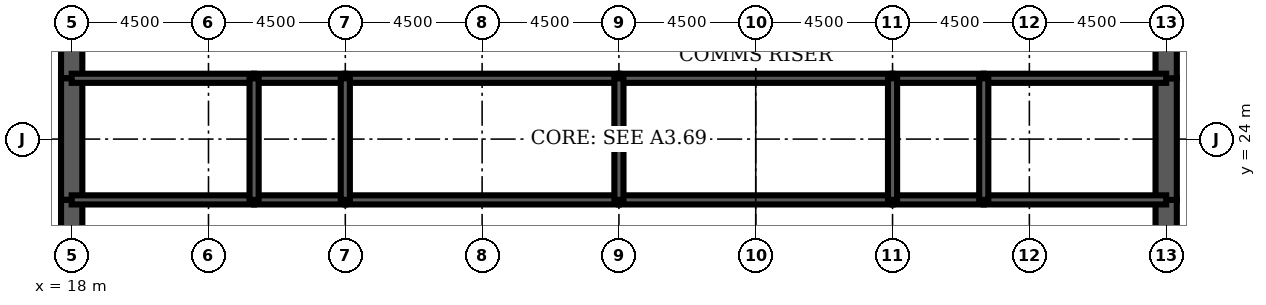
"""IFC4 building model, lengths in metres.
Left out: names, types, materials, properties, quantities, classifications, styles, units other than length and angle.
Written with IfcOpenShell. Run it as: python <this file> out.ifc"""

import sys

from ifc_helpers import new_model, si_unit, direction, frame, frame_2d, origin, place, context, subcontext, project, spatial, rectangle, extrude, element, fill, save


model = new_model("IFC4")
c1 = context("Model", 3, precision=1e-05, world=origin(), true_north=direction((0.0, 1.0)))
c2 = subcontext(c1, "Body", "Model", "MODEL_VIEW")
j1 = project(units=[si_unit("LENGTHUNIT", "METRE"), si_unit("PLANEANGLEUNIT", "RADIAN")], contexts=[c1])
p1 = place(None, origin())
s1 = spatial("IfcSite", under=j1, at=p1, CompositionType="ELEMENT")
p2 = place(p1, origin())
s2 = spatial("IfcBuilding", under=s1, at=p2, CompositionType="ELEMENT")
p3 = place(p2, frame((0.0, 0.0, 296.3)))
s3 = spatial("IfcBuildingStorey", under=s2, at=p3, CompositionType="ELEMENT", Elevation=296.3)
p4 = place(p3, frame((18.0, 28.8, 0.0), z_axis=(0.0, 0.0, 1.0), x_axis=(0.0, -1.0, 0.0)))
e1 = element("IfcWall", 1, at=p4, inside=s3, PredefinedType="SHEAR", context=c2, shape_type="SweptSolid", body=[
    extrude(rectangle(XDim=2.8, YDim=0.7, at=frame_2d((1.4, 0.0))), origin(), (0.0, 0.0, 1.0), 4.2),
])
p5 = place(p4, frame((0.4, 0.0, 0.0)))
e2 = element("IfcOpeningElement", 2, at=p5, cuts=e1, PredefinedType="OPENING", context=c2, shape_type="SweptSolid", body=[
    extrude(rectangle(XDim=1.8, YDim=2.1, at=frame_2d((0.9, 1.05))), frame((0.0, 0.36, 0.0), z_axis=(0.0, -1.0, 0.0), x_axis=(1.0, 0.0, 0.0)), (0.0, 0.0, 1.0), 0.72),
])
p6 = place(p3, frame((18.0, 26.0, 0.0), z_axis=(0.0, 0.0, 1.0), x_axis=(0.0, -1.0, 0.0)))
e3 = element("IfcWall", 3, at=p6, inside=s3, PredefinedType="SHEAR", context=c2, shape_type="SweptSolid", body=[
    extrude(rectangle(XDim=4.0, YDim=0.7, at=frame_2d((2.0, 0.0))), origin(), (0.0, 0.0, 1.0), 4.2),
])
p7 = place(p3, frame((18.0, 22.0, 0.0), z_axis=(0.0, 0.0, 1.0), x_axis=(0.0, -1.0, 0.0)))
e4 = element("IfcWall", 4, at=p7, inside=s3, PredefinedType="SHEAR", context=c2, shape_type="SweptSolid", body=[
    extrude(rectangle(XDim=2.8, YDim=0.7, at=frame_2d((1.4, 0.0))), origin(), (0.0, 0.0, 1.0), 4.2),
])
p8 = place(p7, frame((0.6, 0.0, 0.0)))
e5 = element("IfcOpeningElement", 5, at=p8, cuts=e4, PredefinedType="OPENING", context=c2, shape_type="SweptSolid", body=[
    extrude(rectangle(XDim=1.8, YDim=2.1, at=frame_2d((0.9, 1.05))), frame((0.0, 0.36, 0.0), z_axis=(0.0, -1.0, 0.0), x_axis=(1.0, 0.0, 0.0)), (0.0, 0.0, 1.0), 0.72),
])
p9 = place(p3, frame((54.0, 19.2, 0.0), z_axis=(0.0, 0.0, 1.0), x_axis=(0.0, 1.0, 0.0)))
e6 = element("IfcWall", 6, at=p9, inside=s3, PredefinedType="SHEAR", context=c2, shape_type="SweptSolid", body=[
    extrude(rectangle(XDim=2.8, YDim=0.7, at=frame_2d((1.4, 0.0))), origin(), (0.0, 0.0, 1.0), 4.2),
])
p10 = place(p9, frame((0.4, 0.0, 0.0)))
e7 = element("IfcOpeningElement", 7, at=p10, cuts=e6, PredefinedType="OPENING", context=c2, shape_type="SweptSolid", body=[
    extrude(rectangle(XDim=1.8, YDim=2.1, at=frame_2d((0.9, 1.05))), frame((0.0, 0.36, 0.0), z_axis=(0.0, -1.0, 0.0), x_axis=(1.0, 0.0, 0.0)), (0.0, 0.0, 1.0), 0.72),
])
p11 = place(p3, frame((54.0, 22.0, 0.0), z_axis=(0.0, 0.0, 1.0), x_axis=(0.0, 1.0, 0.0)))
e8 = element("IfcWall", 8, at=p11, inside=s3, PredefinedType="SHEAR", context=c2, shape_type="SweptSolid", body=[
    extrude(rectangle(XDim=4.0, YDim=0.7, at=frame_2d((2.0, 0.0))), origin(), (0.0, 0.0, 1.0), 4.2),
])
p12 = place(p3, frame((54.0, 26.0, 0.0), z_axis=(0.0, 0.0, 1.0), x_axis=(0.0, 1.0, 0.0)))
e9 = element("IfcWall", 9, at=p12, inside=s3, PredefinedType="SHEAR", context=c2, shape_type="SweptSolid", body=[
    extrude(rectangle(XDim=2.8, YDim=0.7, at=frame_2d((1.4, 0.0))), origin(), (0.0, 0.0, 1.0), 4.2),
])
p13 = place(p12, frame((0.6, 0.0, 0.0)))
e10 = element("IfcOpeningElement", 10, at=p13, cuts=e9, PredefinedType="OPENING", context=c2, shape_type="SweptSolid", body=[
    extrude(rectangle(XDim=1.8, YDim=2.1, at=frame_2d((0.9, 1.05))), frame((0.0, 0.36, 0.0), z_axis=(0.0, -1.0, 0.0), x_axis=(1.0, 0.0, 0.0)), (0.0, 0.0, 1.0), 0.72),
])
p14 = place(p3, frame((18.0, 22.0, 0.0), z_axis=(0.0, 0.0, 1.0), x_axis=(1.0, 0.0, 0.0)))
e11 = element("IfcWall", 11, at=p14, inside=s3, PredefinedType="SOLIDWALL", context=c2, shape_type="SweptSolid", body=[
    extrude(rectangle(XDim=6.0, YDim=0.3, at=frame_2d((3.0, 0.0))), origin(), (0.0, 0.0, 1.0), 4.2),
])
p15 = place(p14, frame((4.4, 0.0, 0.0)))
e12 = element("IfcOpeningElement", 12, at=p15, cuts=e11, PredefinedType="OPENING", context=c2, shape_type="SweptSolid", body=[
    extrude(rectangle(XDim=1.0, YDim=2.1, at=frame_2d((0.5, 1.05))), frame((0.0, 0.16, 0.0), z_axis=(0.0, -1.0, 0.0), x_axis=(1.0, 0.0, 0.0)), (0.0, 0.0, 1.0), 0.32),
])
p16 = place(p14, frame((0.6, 0.0, 0.0)))
e13 = element("IfcOpeningElement", 13, at=p16, cuts=e11, PredefinedType="OPENING", context=c2, shape_type="SweptSolid", body=[
    extrude(rectangle(XDim=1.0, YDim=2.1, at=frame_2d((0.5, 1.05))), frame((0.0, 0.16, 0.0), z_axis=(0.0, -1.0, 0.0), x_axis=(1.0, 0.0, 0.0)), (0.0, 0.0, 1.0), 0.32),
])
p17 = place(p3, frame((24.0, 22.0, 0.0), z_axis=(0.0, 0.0, 1.0), x_axis=(1.0, 0.0, 0.0)))
e14 = element("IfcWall", 14, at=p17, inside=s3, PredefinedType="SOLIDWALL", context=c2, shape_type="SweptSolid", body=[
    extrude(rectangle(XDim=3.0, YDim=0.3, at=frame_2d((1.5, 0.0))), origin(), (0.0, 0.0, 1.0), 4.2),
])
p18 = place(p17, frame((1.0, 0.0, 0.0)))
e15 = element("IfcOpeningElement", 15, at=p18, cuts=e14, PredefinedType="OPENING", context=c2, shape_type="SweptSolid", body=[
    extrude(rectangle(XDim=1.0, YDim=2.1, at=frame_2d((0.5, 1.05))), frame((0.0, 0.16, 0.0), z_axis=(0.0, -1.0, 0.0), x_axis=(1.0, 0.0, 0.0)), (0.0, 0.0, 1.0), 0.32),
])
p19 = place(p3, frame((27.0, 22.0, 0.0), z_axis=(0.0, 0.0, 1.0), x_axis=(1.0, 0.0, 0.0)))
e16 = element("IfcWall", 16, at=p19, inside=s3, PredefinedType="SOLIDWALL", context=c2, shape_type="SweptSolid", body=[
    extrude(rectangle(XDim=9.0, YDim=0.3, at=frame_2d((4.5, 0.0))), origin(), (0.0, 0.0, 1.0), 4.2),
])
p20 = place(p19, frame((4.0, 0.0, 0.0)))
e17 = element("IfcOpeningElement", 17, at=p20, cuts=e16, PredefinedType="OPENING", context=c2, shape_type="SweptSolid", body=[
    extrude(rectangle(XDim=1.0, YDim=2.1, at=frame_2d((0.5, 1.05))), frame((0.0, 0.16, 0.0), z_axis=(0.0, -1.0, 0.0), x_axis=(1.0, 0.0, 0.0)), (0.0, 0.0, 1.0), 0.32),
])
p21 = place(p3, frame((36.0, 22.0, 0.0), z_axis=(0.0, 0.0, 1.0), x_axis=(1.0, 0.0, 0.0)))
e18 = element("IfcWall", 18, at=p21, inside=s3, PredefinedType="SOLIDWALL", context=c2, shape_type="SweptSolid", body=[
    extrude(rectangle(XDim=9.0, YDim=0.3, at=frame_2d((4.5, 0.0))), origin(), (0.0, 0.0, 1.0), 4.2),
])
p22 = place(p21, frame((4.0, 0.0, 0.0)))
e19 = element("IfcOpeningElement", 19, at=p22, cuts=e18, PredefinedType="OPENING", context=c2, shape_type="SweptSolid", body=[
    extrude(rectangle(XDim=1.0, YDim=2.1, at=frame_2d((0.5, 1.05))), frame((0.0, 0.16, 0.0), z_axis=(0.0, -1.0, 0.0), x_axis=(1.0, 0.0, 0.0)), (0.0, 0.0, 1.0), 0.32),
])
p23 = place(p3, frame((45.0, 22.0, 0.0), z_axis=(0.0, 0.0, 1.0), x_axis=(1.0, 0.0, 0.0)))
e20 = element("IfcWall", 20, at=p23, inside=s3, PredefinedType="SOLIDWALL", context=c2, shape_type="SweptSolid", body=[
    extrude(rectangle(XDim=3.0, YDim=0.3, at=frame_2d((1.5, 0.0))), origin(), (0.0, 0.0, 1.0), 4.2),
])
p24 = place(p23, frame((1.0, 0.0, 0.0)))
e21 = element("IfcOpeningElement", 21, at=p24, cuts=e20, PredefinedType="OPENING", context=c2, shape_type="SweptSolid", body=[
    extrude(rectangle(XDim=1.0, YDim=2.1, at=frame_2d((0.5, 1.05))), frame((0.0, 0.16, 0.0), z_axis=(0.0, -1.0, 0.0), x_axis=(1.0, 0.0, 0.0)), (0.0, 0.0, 1.0), 0.32),
])
p25 = place(p3, frame((48.0, 22.0, 0.0), z_axis=(0.0, 0.0, 1.0), x_axis=(1.0, 0.0, 0.0)))
e22 = element("IfcWall", 22, at=p25, inside=s3, PredefinedType="SOLIDWALL", context=c2, shape_type="SweptSolid", body=[
    extrude(rectangle(XDim=6.0, YDim=0.3, at=frame_2d((3.0, 0.0))), origin(), (0.0, 0.0, 1.0), 4.2),
])
p26 = place(p25, frame((2.0, 0.0, 0.0)))
e23 = element("IfcOpeningElement", 23, at=p26, cuts=e22, PredefinedType="OPENING", context=c2, shape_type="SweptSolid", body=[
    extrude(rectangle(XDim=1.0, YDim=2.1, at=frame_2d((0.5, 1.05))), frame((0.0, 0.16, 0.0), z_axis=(0.0, -1.0, 0.0), x_axis=(1.0, 0.0, 0.0)), (0.0, 0.0, 1.0), 0.32),
])
p27 = place(p25, frame((4.1, 0.0, 0.0)))
e24 = element("IfcOpeningElement", 24, at=p27, cuts=e22, PredefinedType="OPENING", context=c2, shape_type="SweptSolid", body=[
    extrude(rectangle(XDim=1.0, YDim=2.1, at=frame_2d((0.5, 1.05))), frame((0.0, 0.16, 0.0), z_axis=(0.0, -1.0, 0.0), x_axis=(1.0, 0.0, 0.0)), (0.0, 0.0, 1.0), 0.32),
])
p28 = place(p3, frame((18.0, 26.0, 0.0), z_axis=(0.0, 0.0, 1.0), x_axis=(1.0, 0.0, 0.0)))
e25 = element("IfcWall", 25, at=p28, inside=s3, PredefinedType="SOLIDWALL", context=c2, shape_type="SweptSolid", body=[
    extrude(rectangle(XDim=6.0, YDim=0.3, at=frame_2d((3.0, 0.0))), origin(), (0.0, 0.0, 1.0), 4.2),
])
p29 = place(p3, frame((24.0, 26.0, 0.0), z_axis=(0.0, 0.0, 1.0), x_axis=(1.0, 0.0, 0.0)))
e26 = element("IfcWall", 26, at=p29, inside=s3, PredefinedType="SOLIDWALL", context=c2, shape_type="SweptSolid", body=[
    extrude(rectangle(XDim=3.0, YDim=0.3, at=frame_2d((1.5, 0.0))), origin(), (0.0, 0.0, 1.0), 4.2),
])
for number, where, z_axis, x_axis in (
    (27, (27.0, 26.0, 0.0), (0.0, 0.0, 1.0), (1.0, 0.0, 0.0)),
    (28, (36.0, 26.0, 0.0), (0.0, 0.0, 1.0), (1.0, 0.0, 0.0)),
):
    element("IfcWall", number, at=place(p3, frame(where, z_axis=z_axis, x_axis=x_axis)), inside=s3, PredefinedType="SOLIDWALL", context=c2, shape_type="SweptSolid", body=[
        extrude(rectangle(XDim=9.0, YDim=0.3, at=frame_2d((4.5, 0.0))), origin(), (0.0, 0.0, 1.0), 4.2),
    ])
p30 = place(p3, frame((45.0, 26.0, 0.0), z_axis=(0.0, 0.0, 1.0), x_axis=(1.0, 0.0, 0.0)))
e29 = element("IfcWall", 29, at=p30, inside=s3, PredefinedType="SOLIDWALL", context=c2, shape_type="SweptSolid", body=[
    extrude(rectangle(XDim=3.0, YDim=0.3, at=frame_2d((1.5, 0.0))), origin(), (0.0, 0.0, 1.0), 4.2),
])
p31 = place(p3, frame((48.0, 26.0, 0.0), z_axis=(0.0, 0.0, 1.0), x_axis=(1.0, 0.0, 0.0)))
e30 = element("IfcWall", 30, at=p31, inside=s3, PredefinedType="SOLIDWALL", context=c2, shape_type="SweptSolid", body=[
    extrude(rectangle(XDim=6.0, YDim=0.3, at=frame_2d((3.0, 0.0))), origin(), (0.0, 0.0, 1.0), 4.2),
])
for number, where, z_axis, x_axis in (
    (31, (24.0, 22.0, 0.0), (0.0, 0.0, 1.0), (0.0, 1.0, 0.0)),
    (32, (27.0, 22.0, 0.0), (0.0, 0.0, 1.0), (0.0, 1.0, 0.0)),
    (33, (36.0, 22.0, 0.0), (0.0, 0.0, 1.0), (0.0, 1.0, 0.0)),
    (34, (45.0, 22.0, 0.0), (0.0, 0.0, 1.0), (0.0, 1.0, 0.0)),
    (35, (48.0, 22.0, 0.0), (0.0, 0.0, 1.0), (0.0, 1.0, 0.0)),
):
    element("IfcWall", number, at=place(p3, frame(where, z_axis=z_axis, x_axis=x_axis)), inside=s3, PredefinedType="SOLIDWALL", context=c2, shape_type="SweptSolid", body=[
        extrude(rectangle(XDim=4.0, YDim=0.3, at=frame_2d((2.0, 0.0))), origin(), (0.0, 0.0, 1.0), 4.2),
    ])
p32 = place(p3, frame((38.5, 22.15, 0.0), z_axis=(0.0, 0.0, 1.0), x_axis=(0.0, 1.0, 0.0)))
e36 = element("IfcWall", 36, at=p32, inside=s3, PredefinedType="PARTITIONING", context=c2, shape_type="SweptSolid", body=[
    extrude(rectangle(XDim=3.7, YDim=0.15, at=frame_2d((1.85, 0.0))), origin(), (0.0, 0.0, 1.0), 3.0),
])
p33 = place(p32, frame((2.2, 0.0, 0.0)))
e37 = element("IfcOpeningElement", 37, at=p33, cuts=e36, PredefinedType="OPENING", context=c2, shape_type="SweptSolid", body=[
    extrude(rectangle(XDim=1.0, YDim=2.1, at=frame_2d((0.5, 1.05))), frame((0.0, 0.085, 0.0), z_axis=(0.0, -1.0, 0.0), x_axis=(1.0, 0.0, 0.0)), (0.0, 0.0, 1.0), 0.17),
])
for number, where, z_axis, x_axis in (
    (38, (19.925, 22.15, 0.0), (0.0, 0.0, 1.0), (0.0, 1.0, 0.0)),
    (39, (51.475, 22.15, 0.0), (0.0, 0.0, 1.0), (0.0, 1.0, 0.0)),
):
    element("IfcWall", number, at=place(p3, frame(where, z_axis=z_axis, x_axis=x_axis)), inside=s3, PredefinedType="PARTITIONING", context=c2, shape_type="SweptSolid", body=[
        extrude(rectangle(XDim=3.7, YDim=0.15, at=frame_2d((1.85, 0.0))), origin(), (0.0, 0.0, 1.0), 3.0),
    ])
p34 = place(p3, frame((23.7, 26.15, 0.0), z_axis=(0.0, 0.0, 1.0), x_axis=(0.0, 1.0, 0.0)))
e40 = element("IfcWall", 40, at=p34, inside=s3, PredefinedType="PARTITIONING", context=c2, shape_type="SweptSolid", body=[
    extrude(rectangle(XDim=2.5, YDim=0.15, at=frame_2d((1.25, 0.0))), origin(), (0.0, 0.0, 1.0), 3.0),
])
p35 = place(p34, frame((0.35, 0.0, 0.0)))
e41 = element("IfcOpeningElement", 41, at=p35, cuts=e40, PredefinedType="OPENING", context=c2, shape_type="SweptSolid", body=[
    extrude(rectangle(XDim=1.0, YDim=2.1, at=frame_2d((0.5, 1.05))), frame((0.0, 0.085, 0.0), z_axis=(0.0, -1.0, 0.0), x_axis=(1.0, 0.0, 0.0)), (0.0, 0.0, 1.0), 0.17),
])
p36 = place(p33, origin())
e42 = element("IfcDoor", 42, at=p36, inside=s3, OperationType="SINGLE_SWING_RIGHT", PredefinedType="DOOR", context=c2, shape_type="SweptSolid", body=[
    extrude(rectangle(XDim=1.0, YDim=2.1, at=frame_2d((0.5, 1.05))), frame((0.0, 0.025, 0.0), z_axis=(0.0, -1.0, 0.0), x_axis=(1.0, 0.0, 0.0)), (0.0, 0.0, 1.0), 0.05),
])
fill(e37, e42)
p37 = place(p35, origin())
e43 = element("IfcDoor", 43, at=p37, inside=s3, OperationType="SINGLE_SWING_LEFT", PredefinedType="DOOR", context=c2, shape_type="SweptSolid", body=[
    extrude(rectangle(XDim=1.0, YDim=2.1, at=frame_2d((0.5, 1.05))), frame((0.0, 0.025, 0.0), z_axis=(0.0, -1.0, 0.0), x_axis=(1.0, 0.0, 0.0)), (0.0, 0.0, 1.0), 0.05),
])
fill(e41, e43)
p38 = place(p8, origin())
e44 = element("IfcDoor", 44, at=p38, inside=s3, OperationType="SINGLE_SWING_LEFT", PredefinedType="DOOR", context=c2, shape_type="SweptSolid", body=[
    extrude(rectangle(XDim=1.8, YDim=2.1, at=frame_2d((0.9, 1.05))), frame((0.0, 0.35, 0.0), z_axis=(0.0, -1.0, 0.0), x_axis=(1.0, 0.0, 0.0)), (0.0, 0.0, 1.0), 0.699),
])
fill(e5, e44)
p39 = place(p5, origin())
e45 = element("IfcDoor", 45, at=p39, inside=s3, OperationType="SINGLE_SWING_LEFT", PredefinedType="DOOR", context=c2, shape_type="SweptSolid", body=[
    extrude(rectangle(XDim=1.8, YDim=2.1, at=frame_2d((0.9, 1.05))), frame((0.0, 0.35, 0.0), z_axis=(0.0, -1.0, 0.0), x_axis=(1.0, 0.0, 0.0)), (0.0, 0.0, 1.0), 0.699),
])
fill(e2, e45)
p40 = place(p10, origin())
e46 = element("IfcDoor", 46, at=p40, inside=s3, OperationType="SINGLE_SWING_LEFT", PredefinedType="DOOR", context=c2, shape_type="SweptSolid", body=[
    extrude(rectangle(XDim=1.8, YDim=2.1, at=frame_2d((0.9, 1.05))), frame((0.0, 0.35, 0.0), z_axis=(0.0, -1.0, 0.0), x_axis=(1.0, 0.0, 0.0)), (0.0, 0.0, 1.0), 0.699),
])
fill(e7, e46)
p41 = place(p13, origin())
e47 = element("IfcDoor", 47, at=p41, inside=s3, OperationType="SINGLE_SWING_LEFT", PredefinedType="DOOR", context=c2, shape_type="SweptSolid", body=[
    extrude(rectangle(XDim=1.8, YDim=2.1, at=frame_2d((0.9, 1.05))), frame((0.0, 0.35, 0.0), z_axis=(0.0, -1.0, 0.0), x_axis=(1.0, 0.0, 0.0)), (0.0, 0.0, 1.0), 0.699),
])
fill(e10, e47)
p42 = place(p15, origin())
e48 = element("IfcDoor", 48, at=p42, inside=s3, OperationType="SINGLE_SWING_RIGHT", PredefinedType="DOOR", context=c2, shape_type="SweptSolid", body=[
    extrude(rectangle(XDim=1.0, YDim=2.1, at=frame_2d((0.5, 1.05))), frame((0.0, 0.025, 0.0), z_axis=(0.0, -1.0, 0.0), x_axis=(1.0, 0.0, 0.0)), (0.0, 0.0, 1.0), 0.05),
])
fill(e12, e48)
p43 = place(p18, origin())
e49 = element("IfcDoor", 49, at=p43, inside=s3, OperationType="SINGLE_SWING_LEFT", PredefinedType="DOOR", context=c2, shape_type="SweptSolid", body=[
    extrude(rectangle(XDim=1.0, YDim=2.1, at=frame_2d((0.5, 1.05))), frame((0.0, 0.025, 0.0), z_axis=(0.0, -1.0, 0.0), x_axis=(1.0, 0.0, 0.0)), (0.0, 0.0, 1.0), 0.05),
])
fill(e15, e49)
p44 = place(p20, origin())
e50 = element("IfcDoor", 50, at=p44, inside=s3, OperationType="SINGLE_SWING_LEFT", PredefinedType="DOOR", context=c2, shape_type="SweptSolid", body=[
    extrude(rectangle(XDim=1.0, YDim=2.1, at=frame_2d((0.5, 1.05))), frame((0.0, 0.025, 0.0), z_axis=(0.0, -1.0, 0.0), x_axis=(1.0, 0.0, 0.0)), (0.0, 0.0, 1.0), 0.05),
])
fill(e17, e50)
p45 = place(p22, origin())
e51 = element("IfcDoor", 51, at=p45, inside=s3, OperationType="SINGLE_SWING_LEFT", PredefinedType="DOOR", context=c2, shape_type="SweptSolid", body=[
    extrude(rectangle(XDim=1.0, YDim=2.1, at=frame_2d((0.5, 1.05))), frame((0.0, 0.025, 0.0), z_axis=(0.0, -1.0, 0.0), x_axis=(1.0, 0.0, 0.0)), (0.0, 0.0, 1.0), 0.05),
])
fill(e19, e51)
p46 = place(p24, origin())
e52 = element("IfcDoor", 52, at=p46, inside=s3, OperationType="SINGLE_SWING_LEFT", PredefinedType="DOOR", context=c2, shape_type="SweptSolid", body=[
    extrude(rectangle(XDim=1.0, YDim=2.1, at=frame_2d((0.5, 1.05))), frame((0.0, 0.025, 0.0), z_axis=(0.0, -1.0, 0.0), x_axis=(1.0, 0.0, 0.0)), (0.0, 0.0, 1.0), 0.05),
])
fill(e21, e52)
p47 = place(p26, origin())
e53 = element("IfcDoor", 53, at=p47, inside=s3, OperationType="SINGLE_SWING_LEFT", PredefinedType="DOOR", context=c2, shape_type="SweptSolid", body=[
    extrude(rectangle(XDim=1.0, YDim=2.1, at=frame_2d((0.5, 1.05))), frame((0.0, 0.025, 0.0), z_axis=(0.0, -1.0, 0.0), x_axis=(1.0, 0.0, 0.0)), (0.0, 0.0, 1.0), 0.05),
])
fill(e23, e53)
p48 = place(p16, origin())
e54 = element("IfcDoor", 54, at=p48, inside=s3, OperationType="SINGLE_SWING_LEFT", PredefinedType="DOOR", context=c2, shape_type="SweptSolid", body=[
    extrude(rectangle(XDim=1.0, YDim=2.1, at=frame_2d((0.5, 1.05))), frame((0.0, 0.025, 0.0), z_axis=(0.0, -1.0, 0.0), x_axis=(1.0, 0.0, 0.0)), (0.0, 0.0, 1.0), 0.05),
])
fill(e13, e54)
p49 = place(p27, origin())
e55 = element("IfcDoor", 55, at=p49, inside=s3, OperationType="SINGLE_SWING_RIGHT", PredefinedType="DOOR", context=c2, shape_type="SweptSolid", body=[
    extrude(rectangle(XDim=1.0, YDim=2.1, at=frame_2d((0.5, 1.05))), frame((0.0, 0.025, 0.0), z_axis=(0.0, -1.0, 0.0), x_axis=(1.0, 0.0, 0.0)), (0.0, 0.0, 1.0), 0.05),
])
fill(e24, e55)
save(model, sys.argv[1])
